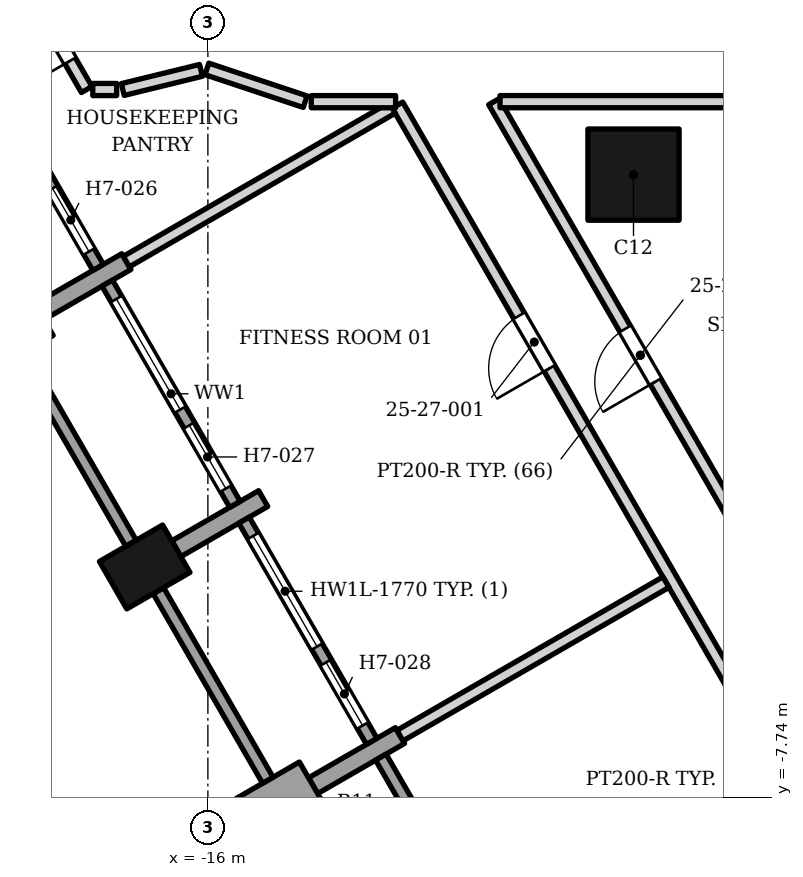
"""IFC4 building model, lengths in metres.
Left out: names, types, materials, properties, quantities, classifications, styles, units other than length and angle.
Written with IfcOpenShell. Run it as: python <this file> out.ifc"""

import sys

from ifc_helpers import new_model, si_unit, direction, frame, frame_2d, origin, origin_2d, place, context, subcontext, project, spatial, rectangle, extrude, element, fill, save


model = new_model("IFC4")
c1 = context("Model", 3, precision=1e-05, world=origin(), true_north=direction((0.0, 1.0)))
c2 = subcontext(c1, "Body", "Model", "MODEL_VIEW")
j1 = project(units=[si_unit("LENGTHUNIT", "METRE"), si_unit("PLANEANGLEUNIT", "RADIAN")], contexts=[c1])
p1 = place(None, origin())
s1 = spatial("IfcSite", under=j1, at=p1, CompositionType="ELEMENT")
p2 = place(p1, origin())
s2 = spatial("IfcBuilding", under=s1, at=p2, CompositionType="ELEMENT")
p3 = place(p2, frame((0.0, 0.0, 112.2)))
s3 = spatial("IfcBuildingStorey", under=s2, at=p3, CompositionType="ELEMENT", Elevation=112.2)
p4 = place(p3, frame((-9.0, 2.5, 0.0), z_axis=(0.0, 0.0, 1.0), x_axis=(1.0, 0.0, 0.0)))
e1 = element("IfcColumn", 1, at=p4, inside=s3, PredefinedType="COLUMN", context=c2, shape_type="SweptSolid", body=[
    extrude(rectangle(XDim=1.5, YDim=1.5, at=origin_2d()), origin(), (0.0, 0.0, 1.0), 3.4),
])
p5 = place(p3, frame((-17.039, -3.952, 0.0), z_axis=(0.0, 0.0, 1.0), x_axis=(0.5, -0.866025403784, 0.0)))
e2 = element("IfcColumn", 2, at=p5, inside=s3, PredefinedType="COLUMN", context=c2, shape_type="SweptSolid", body=[
    extrude(rectangle(XDim=0.9, YDim=1.2, at=origin_2d()), origin(), (0.0, 0.0, 1.0), 3.4),
])
p6 = place(p3, frame((-19.809, -0.355, 0.0), z_axis=(0.0, 0.0, 1.0), x_axis=(0.866043267704, 0.499969057507, 0.0)))
e3 = element("IfcWall", 3, at=p6, inside=s3, PredefinedType="SOLIDWALL", context=c2, shape_type="SweptSolid", body=[
    extrude(rectangle(XDim=1.2, YDim=0.9, at=frame_2d((0.6, 0.0))), origin(), (0.0, 0.0, 1.0), 2.63),
])
p7 = place(p3, frame((-18.77, 0.245, 0.0), z_axis=(0.0, 0.0, 1.0), x_axis=(0.865976140824, 0.500085316245, 0.0)))
e4 = element("IfcWall", 4, at=p7, inside=s3, PredefinedType="SOLIDWALL", context=c2, shape_type="SweptSolid", body=[
    extrude(rectangle(XDim=1.65, YDim=0.3, at=frame_2d((0.825, 0.0))), origin(), (0.0, 0.0, 1.0), 2.65),
])
p8 = place(p3, frame((-16.519, -3.652, 0.0), z_axis=(0.0, 0.0, 1.0), x_axis=(0.866003217194, 0.500038426333, 0.0)))
e5 = element("IfcWall", 5, at=p8, inside=s3, PredefinedType="SOLIDWALL", context=c2, shape_type="SweptSolid", body=[
    extrude(rectangle(XDim=1.65, YDim=0.3, at=frame_2d((0.825, 0.0))), origin(), (0.0, 0.0, 1.0), 2.65),
])
p9 = place(p3, frame((-15.309, -8.149, 0.0), z_axis=(0.0, 0.0, 1.0), x_axis=(0.866043267704, 0.499969057507, 0.0)))
e6 = element("IfcWall", 6, at=p9, inside=s3, PredefinedType="SOLIDWALL", context=c2, shape_type="SweptSolid", body=[
    extrude(rectangle(XDim=1.2, YDim=0.9, at=frame_2d((0.6, 0.0))), origin(), (0.0, 0.0, 1.0), 2.63),
])
p10 = place(p3, frame((-12.841, -6.725, 0.0), z_axis=(0.0, 0.0, 1.0), x_axis=(-0.866040211805, -0.499974350878, 0.0)))
e7 = element("IfcWall", 7, at=p10, inside=s3, PredefinedType="SOLIDWALL", context=c2, shape_type="SweptSolid", body=[
    extrude(rectangle(XDim=1.65, YDim=0.3, at=frame_2d((0.825, 0.0))), origin(), (0.0, 0.0, 1.0), 2.474),
])
p11 = place(p3, frame((-19.905, 4.612, 0.0), z_axis=(0.0, 0.0, 1.0), x_axis=(0.500027713859, -0.866009402589, 0.0)))
e8 = element("IfcWall", 8, at=p11, inside=s3, PredefinedType="ELEMENTEDWALL", context=c2, shape_type="SweptSolid", body=[
    extrude(rectangle(XDim=4.2, YDim=0.2, at=frame_2d((2.1, 0.0))), origin(), (0.0, 0.0, 1.0), 2.45),
])
p12 = place(p11, frame((0.3, 0.0, 0.6)))
e9 = element("IfcOpeningElement", 9, at=p12, cuts=e8, PredefinedType="OPENING", context=c2, shape_type="SweptSolid", body=[
    extrude(rectangle(XDim=2.1, YDim=1.75, at=frame_2d((1.05, 0.875))), frame((0.0, 0.11, 0.0), z_axis=(0.0, -1.0, 0.0), x_axis=(1.0, 0.0, 0.0)), (0.0, 0.0, 1.0), 0.22),
])
p13 = place(p11, frame((2.7, 0.0, 0.0)))
e10 = element("IfcOpeningElement", 10, at=p13, cuts=e8, PredefinedType="OPENING", context=c2, shape_type="SweptSolid", body=[
    extrude(rectangle(XDim=1.2, YDim=2.35, at=frame_2d((0.6, 1.175))), frame((0.0, 0.11, 0.0), z_axis=(0.0, -1.0, 0.0), x_axis=(1.0, 0.0, 0.0)), (0.0, 0.0, 1.0), 0.22),
])
p14 = place(p3, frame((-19.064, -0.445, 0.0), z_axis=(0.0, 0.0, 1.0), x_axis=(0.500012057535, -0.866018442252, 0.0)))
e11 = element("IfcWall", 11, at=p14, inside=s3, PredefinedType="SOLIDWALL", context=c2, shape_type="SweptSolid", body=[
    extrude(rectangle(XDim=3.6, YDim=0.2, at=frame_2d((1.8, 0.0))), origin(), (0.0, 0.0, 1.0), 2.63),
])
p15 = place(p3, frame((-17.655, 0.715, 0.0), z_axis=(0.0, 0.0, 1.0), x_axis=(0.500002543286, -0.866023935413, 0.0)))
e12 = element("IfcWall", 12, at=p15, inside=s3, PredefinedType="ELEMENTEDWALL", context=c2, shape_type="SweptSolid", body=[
    extrude(rectangle(XDim=4.2, YDim=0.2, at=frame_2d((2.1, 0.0))), origin(), (0.0, 0.0, 1.0), 2.65),
])
p16 = place(p15, frame((0.3, 0.0, 0.6)))
e13 = element("IfcOpeningElement", 13, at=p16, cuts=e12, PredefinedType="OPENING", context=c2, shape_type="SweptSolid", body=[
    extrude(rectangle(XDim=2.1, YDim=1.8, at=frame_2d((1.05, 0.9))), frame((0.0, 0.11, 0.0), z_axis=(0.0, -1.0, 0.0), x_axis=(1.0, 0.0, 0.0)), (0.0, 0.0, 1.0), 0.22),
])
p17 = place(p15, frame((2.7, 0.0, 0.0)))
e14 = element("IfcOpeningElement", 14, at=p17, cuts=e12, PredefinedType="OPENING", context=c2, shape_type="SweptSolid", body=[
    extrude(rectangle(XDim=1.2, YDim=2.4, at=frame_2d((0.6, 1.2))), frame((0.0, 0.11, 0.0), z_axis=(0.0, -1.0, 0.0), x_axis=(1.0, 0.0, 0.0)), (0.0, 0.0, 1.0), 0.22),
])
p18 = place(p3, frame((-16.814, -4.342, 0.0), z_axis=(0.0, 0.0, 1.0), x_axis=(0.500012057535, -0.866018442252, 0.0)))
e15 = element("IfcWall", 15, at=p18, inside=s3, PredefinedType="SOLIDWALL", context=c2, shape_type="SweptSolid", body=[
    extrude(rectangle(XDim=3.6, YDim=0.2, at=frame_2d((1.8, 0.0))), origin(), (0.0, 0.0, 1.0), 2.63),
])
p19 = place(p3, frame((-15.405, -3.182, 0.0), z_axis=(0.0, 0.0, 1.0), x_axis=(0.500027713859, -0.866009402589, 0.0)))
e16 = element("IfcWall", 16, at=p19, inside=s3, PredefinedType="ELEMENTEDWALL", context=c2, shape_type="SweptSolid", body=[
    extrude(rectangle(XDim=4.2, YDim=0.2, at=frame_2d((2.1, 0.0))), origin(), (0.0, 0.0, 1.0), 2.474),
])
p20 = place(p19, frame((0.3, 0.0, 0.6)))
e17 = element("IfcOpeningElement", 17, at=p20, cuts=e16, PredefinedType="OPENING", context=c2, shape_type="SweptSolid", body=[
    extrude(rectangle(XDim=2.1, YDim=1.77, at=frame_2d((1.05, 0.885))), frame((0.0, 0.11, 0.0), z_axis=(0.0, -1.0, 0.0), x_axis=(1.0, 0.0, 0.0)), (0.0, 0.0, 1.0), 0.22),
])
p21 = place(p19, frame((2.7, 0.0, 0.0)))
e18 = element("IfcOpeningElement", 18, at=p21, cuts=e16, PredefinedType="OPENING", context=c2, shape_type="SweptSolid", body=[
    extrude(rectangle(XDim=1.2, YDim=2.37, at=frame_2d((0.6, 1.185))), frame((0.0, 0.11, 0.0), z_axis=(0.0, -1.0, 0.0), x_axis=(1.0, 0.0, 0.0)), (0.0, 0.0, 1.0), 0.22),
])
p22 = place(p3, frame((-13.155, -7.079, 0.0), z_axis=(0.0, 0.0, 1.0), x_axis=(0.500002543286, -0.866023935413, 0.0)))
e19 = element("IfcWall", 19, at=p22, inside=s3, PredefinedType="ELEMENTEDWALL", context=c2, shape_type="SweptSolid", body=[
    extrude(rectangle(XDim=4.2, YDim=0.2, at=frame_2d((2.1, 0.0))), origin(), (0.0, 0.0, 1.0), 2.65),
])
p23 = place(p3, frame((-12.882, 3.644, 0.0), z_axis=(0.0, 0.0, 1.0), x_axis=(0.500000325599, -0.866025215799, 0.0)))
e20 = element("IfcWall", 20, at=p23, inside=s3, PredefinedType="PARTITIONING", context=c2, shape_type="SweptSolid", body=[
    extrude(rectangle(XDim=25.63, YDim=0.2, at=frame_2d((12.815, 0.0))), origin(), (0.0, 0.0, 1.0), 2.384),
])
p24 = place(p23, frame((4.0, 0.0, 0.0)))
e21 = element("IfcOpeningElement", 21, at=p24, cuts=e20, PredefinedType="OPENING", context=c2, shape_type="SweptSolid", body=[
    extrude(rectangle(XDim=1.0, YDim=2.1, at=frame_2d((0.5, 1.05))), frame((0.0, 0.11, 0.0), z_axis=(0.0, -1.0, 0.0), x_axis=(1.0, 0.0, 0.0)), (0.0, 0.0, 1.0), 0.22),
])
p25 = place(p23, frame((14.95, 0.0, 0.0)))
e22 = element("IfcOpeningElement", 22, at=p25, cuts=e20, PredefinedType="OPENING", context=c2, shape_type="SweptSolid", body=[
    extrude(rectangle(XDim=1.6, YDim=2.1, at=frame_2d((0.8, 1.05))), frame((0.0, 0.11, 0.0), z_axis=(0.0, -1.0, 0.0), x_axis=(1.0, 0.0, 0.0)), (0.0, 0.0, 1.0), 0.22),
])
p26 = place(p23, frame((23.515, 0.0, 0.0)))
e23 = element("IfcOpeningElement", 23, at=p26, cuts=e20, PredefinedType="OPENING", context=c2, shape_type="SweptSolid", body=[
    extrude(rectangle(XDim=1.1, YDim=2.1, at=frame_2d((0.55, 1.05))), frame((0.0, 0.11, 0.0), z_axis=(0.0, -1.0, 0.0), x_axis=(1.0, 0.0, 0.0)), (0.0, 0.0, 1.0), 0.22),
])
p27 = place(p3, frame((-12.84, -6.725, 0.0), z_axis=(0.0, 0.0, 1.0), x_axis=(0.866209732401, 0.499680597475, 0.0)))
e24 = element("IfcWall", 24, at=p27, inside=s3, PredefinedType="PARTITIONING", context=c2, shape_type="SweptSolid", body=[
    extrude(rectangle(XDim=5.05, YDim=0.2, at=frame_2d((2.525, 0.0))), origin(), (0.0, 0.0, 1.0), 2.552),
])
p28 = place(p3, frame((-17.341, 1.07, 0.0), z_axis=(0.0, 0.0, 1.0), x_axis=(0.865894858421, 0.500226043064, 0.0)))
e25 = element("IfcWall", 25, at=p28, inside=s3, PredefinedType="PARTITIONING", context=c2, shape_type="SweptSolid", body=[
    extrude(rectangle(XDim=5.05, YDim=0.2, at=frame_2d((2.525, 0.0))), origin(), (0.0, 0.0, 1.0), 2.474),
])
p29 = place(p3, frame((-16.016, 4.238, 0.0), z_axis=(0.0, 0.0, 1.0), x_axis=(0.948654629562, -0.31631375849, 0.0)))
e26 = element("IfcWall", 26, at=p29, inside=s3, PredefinedType="PARTITIONING", context=c2, shape_type="SweptSolid", body=[
    extrude(rectangle(XDim=1.703, YDim=0.2, at=frame_2d((0.852, 0.0))), origin(), (0.0, 0.0, 1.0), 3.23),
])
p30 = place(p3, frame((-14.3, 3.699, 0.0), z_axis=(0.0, 0.0, 1.0), x_axis=(1.0, 0.0, 0.0)))
e27 = element("IfcWall", 27, at=p30, inside=s3, PredefinedType="PARTITIONING", context=c2, shape_type="SweptSolid", body=[
    extrude(rectangle(XDim=1.387, YDim=0.2, at=frame_2d((0.694, 0.0))), origin(), (0.0, 0.0, 1.0), 2.474),
])
p31 = place(p3, frame((-11.295, 3.7, 0.0), z_axis=(0.0, 0.0, 1.0), x_axis=(0.500160597015, -0.865932663198, 0.0)))
e28 = element("IfcWall", 28, at=p31, inside=s3, PredefinedType="PARTITIONING", context=c2, shape_type="SweptSolid", body=[
    extrude(rectangle(XDim=9.63, YDim=0.2, at=frame_2d((4.815, 0.0))), origin(), (0.0, 0.0, 1.0), 2.552),
])
p32 = place(p31, frame((4.315, 0.0, 0.0)))
e29 = element("IfcOpeningElement", 29, at=p32, cuts=e28, PredefinedType="OPENING", context=c2, shape_type="SweptSolid", body=[
    extrude(rectangle(XDim=1.0, YDim=2.1, at=frame_2d((0.5, 1.05))), frame((0.0, 0.11, 0.0), z_axis=(0.0, -1.0, 0.0), x_axis=(1.0, 0.0, 0.0)), (0.0, 0.0, 1.0), 0.22),
])
p33 = place(p3, frame((-11.195, 3.7, 0.0), z_axis=(0.0, 0.0, 1.0), x_axis=(1.0, 0.0, 0.0)))
e30 = element("IfcWall", 30, at=p33, inside=s3, PredefinedType="PARTITIONING", context=c2, shape_type="SweptSolid", body=[
    extrude(rectangle(XDim=5.195, YDim=0.2, at=frame_2d((2.598, 0.0))), origin(), (0.0, 0.0, 1.0), 2.832),
])
p34 = place(p3, frame((-19.439, 6.403, 0.0), z_axis=(0.0, 0.0, 1.0), x_axis=(0.500017289984, -0.866015421177, 0.0)))
e31 = element("IfcWall", 31, at=p34, inside=s3, PredefinedType="PARTITIONING", context=c2, shape_type="SweptSolid", body=[
    extrude(rectangle(XDim=2.891, YDim=0.2, at=frame_2d((1.446, 0.0))), origin(), (0.0, 0.0, 1.0), 2.45),
])
p35 = place(p34, frame((1.446, 0.0, 0.0)))
e32 = element("IfcOpeningElement", 32, at=p35, cuts=e31, PredefinedType="OPENING", context=c2, shape_type="SweptSolid", body=[
    extrude(rectangle(XDim=0.9, YDim=2.1, at=frame_2d((0.45, 1.05))), frame((0.0, 0.11, 0.0), z_axis=(0.0, -1.0, 0.0), x_axis=(1.0, 0.0, 0.0)), (0.0, 0.0, 1.0), 0.22),
])
p36 = place(p3, frame((-17.893, 3.899, 0.0), z_axis=(0.0, 0.0, 1.0), x_axis=(1.0, 0.0, 0.0)))
e33 = element("IfcWall", 33, at=p36, inside=s3, PredefinedType="PARTITIONING", context=c2, shape_type="SweptSolid", body=[
    extrude(rectangle(XDim=0.393, YDim=0.2, at=frame_2d((0.197, 0.0))), origin(), (0.0, 0.0, 1.0), 3.23),
])
p37 = place(p3, frame((-17.4, 3.899, 0.0), z_axis=(0.0, 0.0, 1.0), x_axis=(0.971323377413, 0.237762268854, 0.0)))
e34 = element("IfcWall", 34, at=p37, inside=s3, PredefinedType="PARTITIONING", context=c2, shape_type="SweptSolid", body=[
    extrude(rectangle(XDim=1.325, YDim=0.2, at=frame_2d((0.662, 0.0))), origin(), (0.0, 0.0, 1.0), 3.23),
])
p38 = place(p13, origin())
e35 = element("IfcDoor", 35, at=p38, inside=s3, OperationType="SINGLE_SWING_LEFT", PredefinedType="DOOR", context=c2, shape_type="SweptSolid", body=[
    extrude(rectangle(XDim=1.2, YDim=2.35, at=frame_2d((0.6, 1.175))), frame((0.0, 0.025, 0.0), z_axis=(0.0, -1.0, 0.0), x_axis=(1.0, 0.0, 0.0)), (0.0, 0.0, 1.0), 0.05),
])
fill(e10, e35)
p39 = place(p16, origin())
e36 = element("IfcWindow", 36, at=p39, inside=s3, PartitioningType="SINGLE_PANEL", PredefinedType="WINDOW", context=c2, shape_type="SweptSolid", body=[
    extrude(rectangle(XDim=2.1, YDim=1.8, at=frame_2d((1.05, 0.9))), frame((0.0, 0.03, 0.0), z_axis=(0.0, -1.0, 0.0), x_axis=(1.0, 0.0, 0.0)), (0.0, 0.0, 1.0), 0.06),
])
fill(e13, e36)
p40 = place(p17, origin())
e37 = element("IfcDoor", 37, at=p40, inside=s3, OperationType="SINGLE_SWING_LEFT", PredefinedType="DOOR", context=c2, shape_type="SweptSolid", body=[
    extrude(rectangle(XDim=1.2, YDim=2.4, at=frame_2d((0.6, 1.2))), frame((0.0, 0.025, 0.0), z_axis=(0.0, -1.0, 0.0), x_axis=(1.0, 0.0, 0.0)), (0.0, 0.0, 1.0), 0.05),
])
fill(e14, e37)
p41 = place(p20, origin())
e38 = element("IfcWindow", 38, at=p41, inside=s3, PartitioningType="SINGLE_PANEL", PredefinedType="WINDOW", context=c2, shape_type="SweptSolid", body=[
    extrude(rectangle(XDim=2.1, YDim=1.77, at=frame_2d((1.05, 0.885))), frame((0.0, 0.03, 0.0), z_axis=(0.0, -1.0, 0.0), x_axis=(1.0, 0.0, 0.0)), (0.0, 0.0, 1.0), 0.06),
])
fill(e17, e38)
p42 = place(p21, origin())
e39 = element("IfcDoor", 39, at=p42, inside=s3, OperationType="SINGLE_SWING_LEFT", PredefinedType="DOOR", context=c2, shape_type="SweptSolid", body=[
    extrude(rectangle(XDim=1.2, YDim=2.37, at=frame_2d((0.6, 1.185))), frame((0.0, 0.025, 0.0), z_axis=(0.0, -1.0, 0.0), x_axis=(1.0, 0.0, 0.0)), (0.0, 0.0, 1.0), 0.05),
])
fill(e18, e39)
p43 = place(p24, origin())
e40 = element("IfcDoor", 40, at=p43, inside=s3, OperationType="SINGLE_SWING_RIGHT", PredefinedType="DOOR", context=c2, shape_type="SweptSolid", body=[
    extrude(rectangle(XDim=1.0, YDim=2.1, at=frame_2d((0.5, 1.05))), frame((0.0, 0.025, 0.0), z_axis=(0.0, -1.0, 0.0), x_axis=(1.0, 0.0, 0.0)), (0.0, 0.0, 1.0), 0.05),
])
fill(e21, e40)
p44 = place(p32, origin())
e41 = element("IfcDoor", 41, at=p44, inside=s3, OperationType="SINGLE_SWING_RIGHT", PredefinedType="DOOR", context=c2, shape_type="SweptSolid", body=[
    extrude(rectangle(XDim=1.0, YDim=2.1, at=frame_2d((0.5, 1.05))), frame((0.0, 0.025, 0.0), z_axis=(0.0, -1.0, 0.0), x_axis=(1.0, 0.0, 0.0)), (0.0, 0.0, 1.0), 0.05),
])
fill(e29, e41)
p45 = place(p35, origin())
e42 = element("IfcDoor", 42, at=p45, inside=s3, OperationType="SINGLE_SWING_RIGHT", PredefinedType="DOOR", context=c2, shape_type="SweptSolid", body=[
    extrude(rectangle(XDim=0.9, YDim=2.1, at=frame_2d((0.45, 1.05))), frame((0.0, 0.025, 0.0), z_axis=(0.0, -1.0, 0.0), x_axis=(1.0, 0.0, 0.0)), (0.0, 0.0, 1.0), 0.05),
])
fill(e32, e42)
save(model, sys.argv[1])
